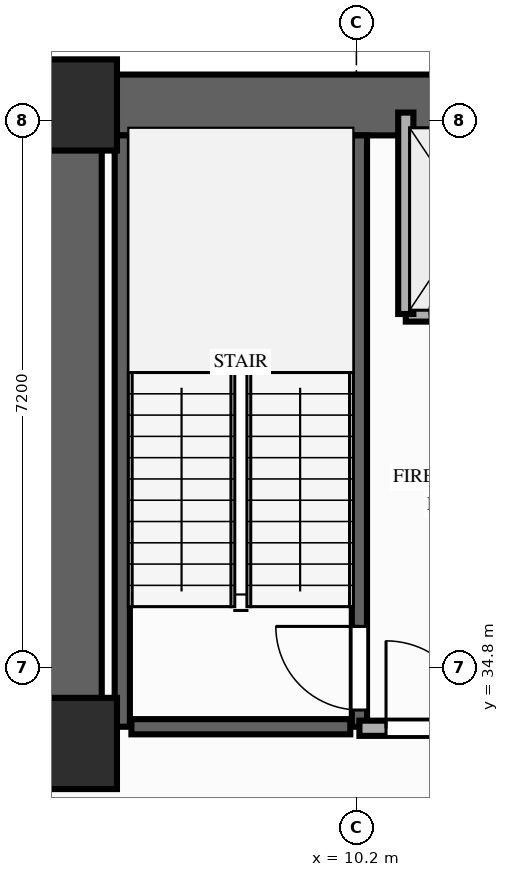
"""IFC4 building model, lengths in metres.
Left out: names, types, materials, properties, quantities, classifications, styles, units other than length and angle.
Written with IfcOpenShell. Run it as: python <this file> out.ifc"""

import sys

from ifc_helpers import new_model, si_unit, direction, frame, frame_2d, origin, origin_2d, place, context, subcontext, project, spatial, rectangle, extrude, element, fill, save


model = new_model("IFC4")
c1 = context("Model", 3, precision=1e-05, world=origin(), true_north=direction((0.0, 1.0)))
c2 = subcontext(c1, "Body", "Model", "MODEL_VIEW")
j1 = project(units=[si_unit("LENGTHUNIT", "METRE"), si_unit("PLANEANGLEUNIT", "RADIAN")], contexts=[c1])
p1 = place(None, origin())
s1 = spatial("IfcSite", under=j1, at=p1, CompositionType="ELEMENT")
p2 = place(p1, origin())
s2 = spatial("IfcBuilding", under=s1, at=p2, CompositionType="ELEMENT")
p3 = place(p2, frame((0.0, 0.0, 79.4)))
s3 = spatial("IfcBuildingStorey", under=s2, at=p3, CompositionType="ELEMENT", Elevation=79.4)
for number, where, z_axis, x_axis in (
    (1, (6.45, 33.8, 0.0), (0.0, 0.0, 1.0), (1.0, 0.0, 0.0)),
    (2, (6.45, 42.2, 0.0), (0.0, 0.0, 1.0), (1.0, 0.0, 0.0)),
):
    element("IfcColumn", number, at=place(p3, frame(where, z_axis=z_axis, x_axis=x_axis)), inside=s3, PredefinedType="COLUMN", context=c2, shape_type="SweptSolid", body=[
        extrude(rectangle(XDim=1.2, YDim=1.2, at=origin_2d()), origin(), (0.0, 0.0, 1.0), 4.0),
    ])
p4 = place(p3, frame((6.45, 42.2, 0.0), z_axis=(0.0, 0.0, 1.0), x_axis=(1.0, 0.0, 0.0)))
e3 = element("IfcWall", 3, at=p4, inside=s3, PredefinedType="SHEAR", context=c2, shape_type="SweptSolid", body=[
    extrude(rectangle(XDim=20.45, YDim=0.8, at=frame_2d((10.225, 0.0))), origin(), (0.0, 0.0, 1.0), 3.82),
])
p5 = place(p3, frame((6.45, 33.8, 0.0), z_axis=(0.0, 0.0, 1.0), x_axis=(0.0, 1.0, 0.0)))
e4 = element("IfcWall", 4, at=p5, inside=s3, PredefinedType="SHEAR", context=c2, shape_type="SweptSolid", body=[
    extrude(rectangle(XDim=7.95, YDim=0.8, at=frame_2d((3.975, 0.0))), origin(), (0.0, 0.0, 1.0), 3.82),
])
p6 = place(p3, frame((7.12, 34.02, 0.0), z_axis=(0.0, 0.0, 1.0), x_axis=(0.0, 1.0, 0.0)))
e5 = element("IfcWall", 5, at=p6, inside=s3, PredefinedType="SHEAR", context=c2, shape_type="SweptSolid", body=[
    extrude(rectangle(XDim=7.78, YDim=0.2, at=frame_2d((3.89, 0.0))), origin(), (0.0, 0.0, 1.0), 3.82),
])
p7 = place(p3, frame((10.24, 34.02, 0.0), z_axis=(0.0, 0.0, 1.0), x_axis=(0.0, 1.0, 0.0)))
e6 = element("IfcWall", 6, at=p7, inside=s3, PredefinedType="SHEAR", context=c2, shape_type="SweptSolid", body=[
    extrude(rectangle(XDim=7.78, YDim=0.2, at=frame_2d((3.89, 0.0))), origin(), (0.0, 0.0, 1.0), 3.82),
])
p8 = place(p7, frame((0.22, 0.0, 0.0)))
e7 = element("IfcOpeningElement", 7, at=p8, cuts=e6, PredefinedType="OPENING", context=c2, shape_type="SweptSolid", body=[
    extrude(rectangle(XDim=1.1, YDim=2.15, at=frame_2d((0.55, 1.075))), frame((0.0, 0.11, 0.0), z_axis=(0.0, -1.0, 0.0), x_axis=(1.0, 0.0, 0.0)), (0.0, 0.0, 1.0), 0.22),
])
p9 = place(p3, frame((7.24, 34.02, 0.0), z_axis=(0.0, 0.0, 1.0), x_axis=(1.0, 0.0, 0.0)))
e8 = element("IfcWall", 8, at=p9, inside=s3, PredefinedType="SHEAR", context=c2, shape_type="SweptSolid", body=[
    extrude(rectangle(XDim=2.88, YDim=0.2, at=frame_2d((1.44, 0.0))), origin(), (0.0, 0.0, 1.0), 3.82),
])
p10 = place(p3, frame((10.85, 39.45, 0.0), z_axis=(0.0, 0.0, 1.0), x_axis=(1.0, 0.0, 0.0)))
e9 = element("IfcWall", 9, at=p10, inside=s3, PredefinedType="MOVABLE", context=c2, shape_type="SweptSolid", body=[
    extrude(rectangle(XDim=1.7, YDim=0.2, at=frame_2d((0.85, 0.0))), origin(), (0.0, 0.0, 1.0), 3.82),
])
p11 = place(p10, frame((0.32, 0.0, 0.0)))
e10 = element("IfcOpeningElement", 10, at=p11, cuts=e9, PredefinedType="OPENING", context=c2, shape_type="SweptSolid", body=[
    extrude(rectangle(XDim=1.05, YDim=2.15, at=frame_2d((0.525, 1.075))), frame((0.0, 0.11, 0.0), z_axis=(0.0, -1.0, 0.0), x_axis=(1.0, 0.0, 0.0)), (0.0, 0.0, 1.0), 0.22),
])
p12 = place(p3, frame((10.85, 39.45, 0.0), z_axis=(0.0, 0.0, 1.0), x_axis=(0.0, 1.0, 0.0)))
e11 = element("IfcWall", 11, at=p12, inside=s3, PredefinedType="MOVABLE", context=c2, shape_type="SweptSolid", body=[
    extrude(rectangle(XDim=2.65, YDim=0.2, at=frame_2d((1.325, 0.0))), origin(), (0.0, 0.0, 1.0), 3.21),
])
p13 = place(p3, frame((10.24, 34.0, 0.0), z_axis=(0.0, 0.0, 1.0), x_axis=(1.0, 0.0, 0.0)))
e12 = element("IfcWall", 12, at=p13, inside=s3, PredefinedType="PARTITIONING", context=c2, shape_type="SweptSolid", body=[
    extrude(rectangle(XDim=2.66, YDim=0.2, at=frame_2d((1.33, 0.0))), origin(), (0.0, 0.0, 1.0), 3.21),
])
p14 = place(p13, frame((0.35, 0.0, 0.0)))
e13 = element("IfcOpeningElement", 13, at=p14, cuts=e12, PredefinedType="OPENING", context=c2, shape_type="SweptSolid", body=[
    extrude(rectangle(XDim=1.15, YDim=2.15, at=frame_2d((0.575, 1.075))), frame((0.0, 0.11, 0.0), z_axis=(0.0, -1.0, 0.0), x_axis=(1.0, 0.0, 0.0)), (0.0, 0.0, 1.0), 0.22),
])
p15 = place(p8, origin())
e14 = element("IfcDoor", 14, at=p15, inside=s3, OperationType="SINGLE_SWING_RIGHT", PredefinedType="DOOR", context=c2, shape_type="SweptSolid", body=[
    extrude(rectangle(XDim=1.1, YDim=2.15, at=frame_2d((0.55, 1.075))), frame((0.0, 0.025, 0.0), z_axis=(0.0, -1.0, 0.0), x_axis=(1.0, 0.0, 0.0)), (0.0, 0.0, 1.0), 0.05),
])
fill(e7, e14)
p16 = place(p14, origin())
e15 = element("IfcDoor", 15, at=p16, inside=s3, OperationType="SINGLE_SWING_LEFT", PredefinedType="DOOR", context=c2, shape_type="SweptSolid", body=[
    extrude(rectangle(XDim=1.15, YDim=2.15, at=frame_2d((0.575, 1.075))), frame((0.0, 0.025, 0.0), z_axis=(0.0, -1.0, 0.0), x_axis=(1.0, 0.0, 0.0)), (0.0, 0.0, 1.0), 0.05),
])
fill(e13, e15)
save(model, sys.argv[1])
